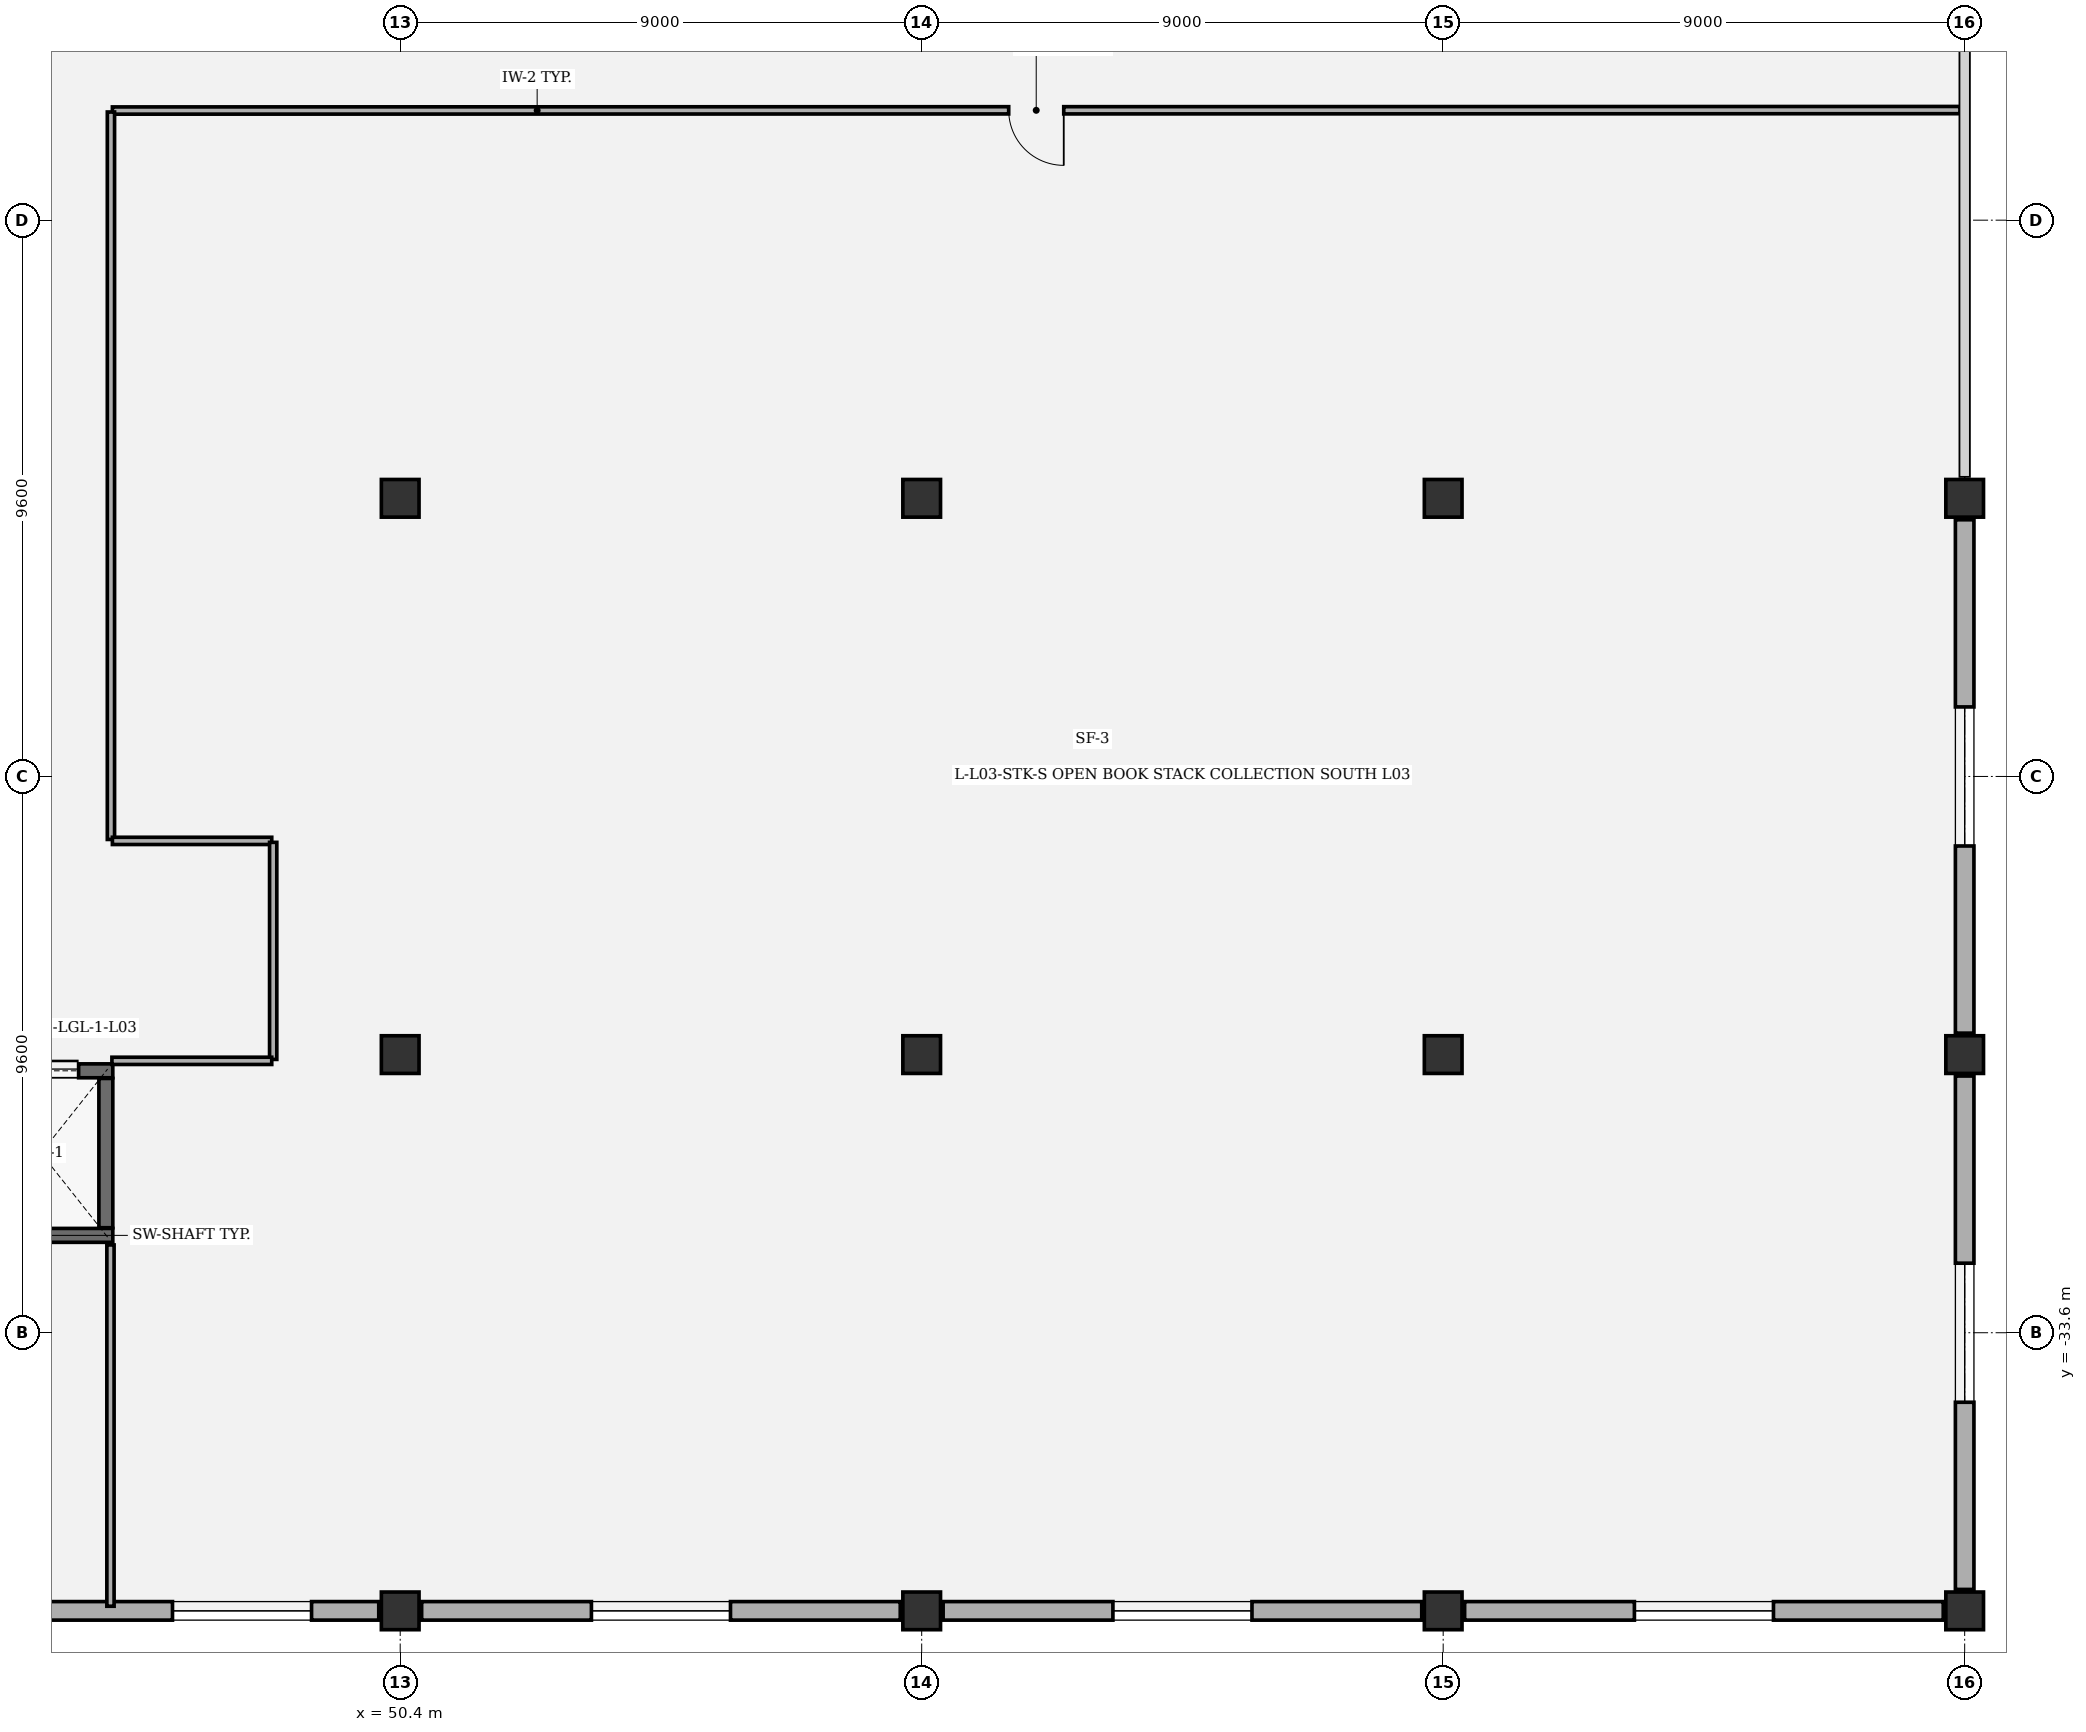
"""IFC4 building model, lengths in metres.
Left out: names, types, materials, properties, quantities, classifications, styles, units other than length and angle.
Written with IfcOpenShell. Run it as: python <this file> out.ifc"""

import sys

from ifc_helpers import new_model, si_unit, direction, frame, frame_2d, origin, origin_2d, place, context, subcontext, project, spatial, rectangle, extrude, element, fill, save


model = new_model("IFC4")
c1 = context("Model", 3, precision=1e-05, world=origin(), true_north=direction((0.0, 1.0)))
c2 = subcontext(c1, "Body", "Model", "MODEL_VIEW")
j1 = project(units=[si_unit("LENGTHUNIT", "METRE"), si_unit("PLANEANGLEUNIT", "RADIAN")], contexts=[c1])
p1 = place(None, origin())
s1 = spatial("IfcSite", under=j1, at=p1, CompositionType="ELEMENT")
p2 = place(p1, origin())
s2 = spatial("IfcBuilding", under=s1, at=p2, CompositionType="ELEMENT")
p3 = place(p2, frame((0.0, 0.0, 17.0)))
s3 = spatial("IfcBuildingStorey", under=s2, at=p3, CompositionType="ELEMENT", Elevation=17.0)
for number, where, z_axis, x_axis in (
    (1, (50.4, -38.4, 0.0), (0.0, 0.0, 1.0), (1.0, 0.0, 0.0)),
    (2, (50.4, -28.8, 0.0), (0.0, 0.0, 1.0), (1.0, 0.0, 0.0)),
    (3, (50.4, -19.2, 0.0), (0.0, 0.0, 1.0), (1.0, 0.0, 0.0)),
    (4, (59.4, -38.4, 0.0), (0.0, 0.0, 1.0), (1.0, 0.0, 0.0)),
    (5, (59.4, -28.8, 0.0), (0.0, 0.0, 1.0), (1.0, 0.0, 0.0)),
    (6, (59.4, -19.2, 0.0), (0.0, 0.0, 1.0), (1.0, 0.0, 0.0)),
    (7, (68.4, -38.4, 0.0), (0.0, 0.0, 1.0), (1.0, 0.0, 0.0)),
    (8, (68.4, -28.8, 0.0), (0.0, 0.0, 1.0), (1.0, 0.0, 0.0)),
    (9, (68.4, -19.2, 0.0), (0.0, 0.0, 1.0), (1.0, 0.0, 0.0)),
    (10, (77.4, -38.4, 0.0), (0.0, 0.0, 1.0), (1.0, 0.0, 0.0)),
    (11, (77.4, -28.8, 0.0), (0.0, 0.0, 1.0), (1.0, 0.0, 0.0)),
    (12, (77.4, -19.2, 0.0), (0.0, 0.0, 1.0), (1.0, 0.0, 0.0)),
):
    element("IfcColumn", number, at=place(p3, frame(where, z_axis=z_axis, x_axis=x_axis)), inside=s3, PredefinedType="COLUMN", context=c2, shape_type="SweptSolid", body=[
        extrude(rectangle(XDim=0.65, YDim=0.65, at=origin_2d()), origin(), (0.0, 0.0, 1.0), 5.0),
    ])
p4 = place(p3, frame((77.4, -29.17, 0.0), z_axis=(0.0, 0.0, 1.0), x_axis=(0.0, -1.0, 0.0)))
e13 = element("IfcWall", 13, at=p4, inside=s3, PredefinedType="SOLIDWALL", context=c2, shape_type="SweptSolid", body=[
    extrude(rectangle(XDim=8.86, YDim=0.32, at=frame_2d((4.43, 0.0))), origin(), (0.0, 0.0, 1.0), 3.937),
])
p5 = place(p4, frame((3.23, 0.0, 0.8)))
e14 = element("IfcOpeningElement", 14, at=p5, cuts=e13, PredefinedType="OPENING", context=c2, shape_type="SweptSolid", body=[
    extrude(rectangle(XDim=2.4, YDim=1.65, at=frame_2d((1.2, 0.825))), frame((0.0, 0.17, 0.0), z_axis=(0.0, -1.0, 0.0), x_axis=(1.0, 0.0, 0.0)), (0.0, 0.0, 1.0), 0.34),
])
p6 = place(p3, frame((77.4, -19.57, 0.0), z_axis=(0.0, 0.0, 1.0), x_axis=(0.0, -1.0, 0.0)))
e15 = element("IfcWall", 15, at=p6, inside=s3, PredefinedType="SOLIDWALL", context=c2, shape_type="SweptSolid", body=[
    extrude(rectangle(XDim=8.86, YDim=0.32, at=frame_2d((4.43, 0.0))), origin(), (0.0, 0.0, 1.0), 3.937),
])
p7 = place(p6, frame((3.23, 0.0, 0.8)))
e16 = element("IfcOpeningElement", 16, at=p7, cuts=e15, PredefinedType="OPENING", context=c2, shape_type="SweptSolid", body=[
    extrude(rectangle(XDim=2.4, YDim=1.65, at=frame_2d((1.2, 0.825))), frame((0.0, 0.17, 0.0), z_axis=(0.0, -1.0, 0.0), x_axis=(1.0, 0.0, 0.0)), (0.0, 0.0, 1.0), 0.34),
])
p8 = place(p3, frame((50.03, -38.4, 0.0), z_axis=(0.0, 0.0, 1.0), x_axis=(-1.0, 0.0, 0.0)))
e17 = element("IfcWall", 17, at=p8, inside=s3, PredefinedType="SOLIDWALL", context=c2, shape_type="SweptSolid", body=[
    extrude(rectangle(XDim=8.26, YDim=0.32, at=frame_2d((4.13, 0.0))), origin(), (0.0, 0.0, 1.0), 3.937),
])
p9 = place(p8, frame((1.16, 0.0, 0.8)))
e18 = element("IfcOpeningElement", 18, at=p9, cuts=e17, PredefinedType="OPENING", context=c2, shape_type="SweptSolid", body=[
    extrude(rectangle(XDim=2.4, YDim=1.65, at=frame_2d((1.2, 0.825))), frame((0.0, 0.17, 0.0), z_axis=(0.0, -1.0, 0.0), x_axis=(1.0, 0.0, 0.0)), (0.0, 0.0, 1.0), 0.34),
])
p10 = place(p3, frame((59.03, -38.4, 0.0), z_axis=(0.0, 0.0, 1.0), x_axis=(-1.0, 0.0, 0.0)))
e19 = element("IfcWall", 19, at=p10, inside=s3, PredefinedType="SOLIDWALL", context=c2, shape_type="SweptSolid", body=[
    extrude(rectangle(XDim=8.26, YDim=0.32, at=frame_2d((4.13, 0.0))), origin(), (0.0, 0.0, 1.0), 3.937),
])
p11 = place(p10, frame((2.93, 0.0, 0.8)))
e20 = element("IfcOpeningElement", 20, at=p11, cuts=e19, PredefinedType="OPENING", context=c2, shape_type="SweptSolid", body=[
    extrude(rectangle(XDim=2.4, YDim=1.65, at=frame_2d((1.2, 0.825))), frame((0.0, 0.17, 0.0), z_axis=(0.0, -1.0, 0.0), x_axis=(1.0, 0.0, 0.0)), (0.0, 0.0, 1.0), 0.34),
])
p12 = place(p3, frame((68.03, -38.4, 0.0), z_axis=(0.0, 0.0, 1.0), x_axis=(-1.0, 0.0, 0.0)))
e21 = element("IfcWall", 21, at=p12, inside=s3, PredefinedType="SOLIDWALL", context=c2, shape_type="SweptSolid", body=[
    extrude(rectangle(XDim=8.26, YDim=0.32, at=frame_2d((4.13, 0.0))), origin(), (0.0, 0.0, 1.0), 3.937),
])
p13 = place(p12, frame((2.93, 0.0, 0.8)))
e22 = element("IfcOpeningElement", 22, at=p13, cuts=e21, PredefinedType="OPENING", context=c2, shape_type="SweptSolid", body=[
    extrude(rectangle(XDim=2.4, YDim=1.65, at=frame_2d((1.2, 0.825))), frame((0.0, 0.17, 0.0), z_axis=(0.0, -1.0, 0.0), x_axis=(1.0, 0.0, 0.0)), (0.0, 0.0, 1.0), 0.34),
])
p14 = place(p3, frame((77.03, -38.4, 0.0), z_axis=(0.0, 0.0, 1.0), x_axis=(-1.0, 0.0, 0.0)))
e23 = element("IfcWall", 23, at=p14, inside=s3, PredefinedType="SOLIDWALL", context=c2, shape_type="SweptSolid", body=[
    extrude(rectangle(XDim=8.26, YDim=0.32, at=frame_2d((4.13, 0.0))), origin(), (0.0, 0.0, 1.0), 3.937),
])
p15 = place(p14, frame((2.93, 0.0, 0.8)))
e24 = element("IfcOpeningElement", 24, at=p15, cuts=e23, PredefinedType="OPENING", context=c2, shape_type="SweptSolid", body=[
    extrude(rectangle(XDim=2.4, YDim=1.65, at=frame_2d((1.2, 0.825))), frame((0.0, 0.17, 0.0), z_axis=(0.0, -1.0, 0.0), x_axis=(1.0, 0.0, 0.0)), (0.0, 0.0, 1.0), 0.34),
])
p16 = place(p3, frame((45.44, -31.92, 0.0), z_axis=(0.0, 0.0, 1.0), x_axis=(-1.0, 0.0, 0.0)))
e25 = element("IfcWall", 25, at=p16, inside=s3, PredefinedType="SHEAR", context=c2, shape_type="SweptSolid", body=[
    extrude(rectangle(XDim=2.48, YDim=0.24, at=frame_2d((1.24, 0.0))), origin(), (0.0, 0.0, 1.0), 4.74),
])
p17 = place(p3, frame((42.96, -29.08, 0.0), z_axis=(0.0, 0.0, 1.0), x_axis=(1.0, 0.0, 0.0)))
e26 = element("IfcWall", 26, at=p17, inside=s3, PredefinedType="SHEAR", context=c2, shape_type="SweptSolid", body=[
    extrude(rectangle(XDim=2.48, YDim=0.24, at=frame_2d((1.24, 0.0))), origin(), (0.0, 0.0, 1.0), 4.74),
])
p18 = place(p17, frame((0.59, 0.0, 0.0)))
e27 = element("IfcOpeningElement", 27, at=p18, cuts=e26, PredefinedType="OPENING", context=c2, shape_type="SweptSolid", body=[
    extrude(rectangle(XDim=1.3, YDim=2.3, at=frame_2d((0.65, 1.15))), frame((0.0, 0.13, 0.0), z_axis=(0.0, -1.0, 0.0), x_axis=(1.0, 0.0, 0.0)), (0.0, 0.0, 1.0), 0.26),
])
p19 = place(p3, frame((45.32, -29.212, 0.0), z_axis=(0.0, 0.0, 1.0), x_axis=(0.0, -1.0, 0.0)))
e28 = element("IfcWall", 28, at=p19, inside=s3, PredefinedType="SHEAR", context=c2, shape_type="SweptSolid", body=[
    extrude(rectangle(XDim=2.576, YDim=0.24, at=frame_2d((1.288, 0.0))), origin(), (0.0, 0.0, 1.0), 4.74),
])
p20 = place(p3, frame((77.32, -12.5, 0.0), z_axis=(0.0, 0.0, 1.0), x_axis=(-0.999999968081, -0.000252662519, 0.0)))
e29 = element("IfcWall", 29, at=p20, inside=s3, PredefinedType="PARTITIONING", context=c2, shape_type="SweptSolid", body=[
    extrude(rectangle(XDim=31.887, YDim=0.125, at=frame_2d((15.943, 0.0))), origin(), (0.0, 0.0, 1.0), 4.74),
])
p21 = place(p20, frame((15.469, 0.0, 0.0)))
e30 = element("IfcOpeningElement", 30, at=p21, cuts=e29, PredefinedType="OPENING", context=c2, shape_type="SweptSolid", body=[
    extrude(rectangle(XDim=0.95, YDim=2.15, at=frame_2d((0.475, 1.075))), frame((0.0, 0.073, 0.0), z_axis=(0.0, -1.0, 0.0), x_axis=(1.0, 0.0, 0.0)), (0.0, 0.0, 1.0), 0.145),
])
p22 = place(p3, frame((45.408, -12.533, 0.0), z_axis=(0.0, 0.0, 1.0), x_axis=(0.0, -1.0, 0.0)))
e31 = element("IfcWall", 31, at=p22, inside=s3, PredefinedType="PARTITIONING", context=c2, shape_type="SweptSolid", body=[
    extrude(rectangle(XDim=12.554, YDim=0.125, at=frame_2d((6.277, 0.0))), origin(), (0.0, 0.0, 1.0), 4.74),
])
p23 = place(p3, frame((48.183, -25.112, 0.0), z_axis=(0.0, 0.0, 1.0), x_axis=(-1.0, 0.0, 0.0)))
e32 = element("IfcWall", 32, at=p23, inside=s3, PredefinedType="PARTITIONING", context=c2, shape_type="SweptSolid", body=[
    extrude(rectangle(XDim=2.75, YDim=0.125, at=frame_2d((1.375, 0.0))), origin(), (0.0, 0.0, 1.0), 4.74),
])
p24 = place(p3, frame((48.208, -25.137, 0.0), z_axis=(0.0, 0.0, 1.0), x_axis=(0.0, -1.0, 0.0)))
e33 = element("IfcWall", 33, at=p24, inside=s3, PredefinedType="PARTITIONING", context=c2, shape_type="SweptSolid", body=[
    extrude(rectangle(XDim=3.746, YDim=0.125, at=frame_2d((1.873, 0.0))), origin(), (0.0, 0.0, 1.0), 4.74),
])
p25 = place(p3, frame((45.425, -28.908, 0.0), z_axis=(0.0, 0.0, 1.0), x_axis=(1.0, 0.0, 0.0)))
e34 = element("IfcWall", 34, at=p25, inside=s3, PredefinedType="PARTITIONING", context=c2, shape_type="SweptSolid", body=[
    extrude(rectangle(XDim=2.758, YDim=0.125, at=frame_2d((1.379, 0.0))), origin(), (0.0, 0.0, 1.0), 4.014),
])
p26 = place(p3, frame((45.4, -32.085, 0.0), z_axis=(0.0, 0.0, 1.0), x_axis=(0.0, -1.0, 0.0)))
e35 = element("IfcWall", 35, at=p26, inside=s3, PredefinedType="PARTITIONING", context=c2, shape_type="SweptSolid", body=[
    extrude(rectangle(XDim=6.235, YDim=0.125, at=frame_2d((3.118, 0.0))), origin(), (0.0, 0.0, 1.0), 4.74),
])
p27 = place(p5, origin())
e36 = element("IfcWindow", 36, at=p27, inside=s3, PartitioningType="SINGLE_PANEL", PredefinedType="WINDOW", context=c2, shape_type="SweptSolid", body=[
    extrude(rectangle(XDim=2.4, YDim=1.65, at=frame_2d((1.2, 0.825))), frame((0.0, 0.03, 0.0), z_axis=(0.0, -1.0, 0.0), x_axis=(1.0, 0.0, 0.0)), (0.0, 0.0, 1.0), 0.06),
])
fill(e14, e36)
p28 = place(p7, origin())
e37 = element("IfcWindow", 37, at=p28, inside=s3, PartitioningType="SINGLE_PANEL", PredefinedType="WINDOW", context=c2, shape_type="SweptSolid", body=[
    extrude(rectangle(XDim=2.4, YDim=1.65, at=frame_2d((1.2, 0.825))), frame((0.0, 0.03, 0.0), z_axis=(0.0, -1.0, 0.0), x_axis=(1.0, 0.0, 0.0)), (0.0, 0.0, 1.0), 0.06),
])
fill(e16, e37)
p29 = place(p9, origin())
e38 = element("IfcWindow", 38, at=p29, inside=s3, PartitioningType="SINGLE_PANEL", PredefinedType="WINDOW", context=c2, shape_type="SweptSolid", body=[
    extrude(rectangle(XDim=2.4, YDim=1.65, at=frame_2d((1.2, 0.825))), frame((0.0, 0.03, 0.0), z_axis=(0.0, -1.0, 0.0), x_axis=(1.0, 0.0, 0.0)), (0.0, 0.0, 1.0), 0.06),
])
fill(e18, e38)
p30 = place(p11, origin())
e39 = element("IfcWindow", 39, at=p30, inside=s3, PartitioningType="SINGLE_PANEL", PredefinedType="WINDOW", context=c2, shape_type="SweptSolid", body=[
    extrude(rectangle(XDim=2.4, YDim=1.65, at=frame_2d((1.2, 0.825))), frame((0.0, 0.03, 0.0), z_axis=(0.0, -1.0, 0.0), x_axis=(1.0, 0.0, 0.0)), (0.0, 0.0, 1.0), 0.06),
])
fill(e20, e39)
p31 = place(p13, origin())
e40 = element("IfcWindow", 40, at=p31, inside=s3, PartitioningType="SINGLE_PANEL", PredefinedType="WINDOW", context=c2, shape_type="SweptSolid", body=[
    extrude(rectangle(XDim=2.4, YDim=1.65, at=frame_2d((1.2, 0.825))), frame((0.0, 0.03, 0.0), z_axis=(0.0, -1.0, 0.0), x_axis=(1.0, 0.0, 0.0)), (0.0, 0.0, 1.0), 0.06),
])
fill(e22, e40)
p32 = place(p15, origin())
e41 = element("IfcWindow", 41, at=p32, inside=s3, PartitioningType="SINGLE_PANEL", PredefinedType="WINDOW", context=c2, shape_type="SweptSolid", body=[
    extrude(rectangle(XDim=2.4, YDim=1.65, at=frame_2d((1.2, 0.825))), frame((0.0, 0.03, 0.0), z_axis=(0.0, -1.0, 0.0), x_axis=(1.0, 0.0, 0.0)), (0.0, 0.0, 1.0), 0.06),
])
fill(e24, e41)
p33 = place(p18, origin())
e42 = element("IfcDoor", 42, at=p33, inside=s3, OperationType="DOUBLE_DOOR_SLIDING", PredefinedType="DOOR", context=c2, shape_type="SweptSolid", body=[
    extrude(rectangle(XDim=1.3, YDim=2.3, at=frame_2d((0.65, 1.15))), frame((0.0, 0.025, 0.0), z_axis=(0.0, -1.0, 0.0), x_axis=(1.0, 0.0, 0.0)), (0.0, 0.0, 1.0), 0.05),
])
fill(e27, e42)
p34 = place(p21, origin())
e43 = element("IfcDoor", 43, at=p34, inside=s3, OperationType="SINGLE_SWING_LEFT", PredefinedType="DOOR", context=c2, shape_type="SweptSolid", body=[
    extrude(rectangle(XDim=0.95, YDim=2.15, at=frame_2d((0.475, 1.075))), frame((0.0, 0.025, 0.0), z_axis=(0.0, -1.0, 0.0), x_axis=(1.0, 0.0, 0.0)), (0.0, 0.0, 1.0), 0.05),
])
fill(e30, e43)
save(model, sys.argv[1])
